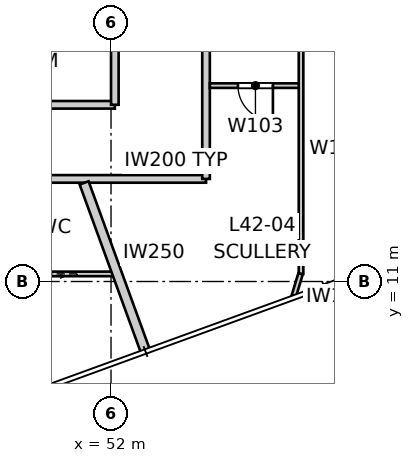
"""IFC4 building model, lengths in metres.
Left out: names, types, materials, properties, quantities, classifications, styles, units other than length and angle.
Written with IfcOpenShell. Run it as: python <this file> out.ifc"""

import sys

from ifc_helpers import new_model, si_unit, direction, frame, frame_2d, origin, place, context, subcontext, project, spatial, rectangle, extrude, element, fill, save


model = new_model("IFC4")
c1 = context("Model", 3, precision=1e-05, world=origin(), true_north=direction((0.0, 1.0)))
c2 = subcontext(c1, "Body", "Model", "MODEL_VIEW")
j1 = project(units=[si_unit("LENGTHUNIT", "METRE"), si_unit("PLANEANGLEUNIT", "RADIAN")], contexts=[c1])
p1 = place(None, origin())
s1 = spatial("IfcSite", under=j1, at=p1, CompositionType="ELEMENT")
p2 = place(p1, origin())
s2 = spatial("IfcBuilding", under=s1, at=p2, CompositionType="ELEMENT")
p3 = place(p2, frame((0.0, 0.0, 154.0)))
s3 = spatial("IfcBuildingStorey", under=s2, at=p3, CompositionType="ELEMENT", Elevation=154.0)
p4 = place(p3, frame((49.242, 13.7, 0.0), z_axis=(0.0, 0.0, 1.0), x_axis=(1.0, 0.0, 0.0)))
e1 = element("IfcWall", 1, at=p4, inside=s3, PredefinedType="PARTITIONING", context=c2, shape_type="SweptSolid", body=[
    extrude(rectangle(XDim=5.258, YDim=0.2, at=frame_2d((2.629, 0.0))), origin(), (0.0, 0.0, 1.0), 3.25),
])
p5 = place(p3, frame((54.5, 13.7, 0.0), z_axis=(0.0, 0.0, 1.0), x_axis=(0.0, 1.0, 0.0)))
e2 = element("IfcWall", 2, at=p5, inside=s3, PredefinedType="PARTITIONING", context=c2, shape_type="SweptSolid", body=[
    extrude(rectangle(XDim=33.4, YDim=0.2, at=frame_2d((16.7, 0.0))), origin(), (0.0, 0.0, 1.0), 3.25),
])
p6 = place(p5, frame((5.028, 0.0, 0.0)))
e3 = element("IfcOpeningElement", 3, at=p6, cuts=e2, PredefinedType="OPENING", context=c2, shape_type="SweptSolid", body=[
    extrude(rectangle(XDim=1.02, YDim=2.1, at=frame_2d((0.51, 1.05))), frame((0.0, 0.11, 0.0), z_axis=(0.0, -1.0, 0.0), x_axis=(1.0, 0.0, 0.0)), (0.0, 0.0, 1.0), 0.22),
])
p7 = place(p5, frame((13.587, 0.0, 0.0)))
e4 = element("IfcOpeningElement", 4, at=p7, cuts=e2, PredefinedType="OPENING", context=c2, shape_type="SweptSolid", body=[
    extrude(rectangle(XDim=1.02, YDim=2.34, at=frame_2d((0.51, 1.17))), frame((0.0, 0.11, 0.0), z_axis=(0.0, -1.0, 0.0), x_axis=(1.0, 0.0, 0.0)), (0.0, 0.0, 1.0), 0.22),
])
p8 = place(p3, frame((52.907, 9.157, 0.0), z_axis=(0.0, 0.0, 1.0), x_axis=(-0.342012883883, 0.939695262975, 0.0)))
e5 = element("IfcWall", 5, at=p8, inside=s3, PredefinedType="PARTITIONING", context=c2, shape_type="SweptSolid", body=[
    extrude(rectangle(XDim=4.722, YDim=0.25, at=frame_2d((2.361, 0.0))), origin(), (0.0, 0.0, 1.0), 3.25),
])
p9 = place(p3, frame((27.9, 15.65, 0.0), z_axis=(0.0, 0.0, 1.0), x_axis=(1.0, 0.0, 0.0)))
e6 = element("IfcWall", 6, at=p9, inside=s3, PredefinedType="PARTITIONING", context=c2, shape_type="SweptSolid", body=[
    extrude(rectangle(XDim=24.2, YDim=0.2, at=frame_2d((12.1, 0.0))), origin(), (0.0, 0.0, 1.0), 3.25),
])
p10 = place(p9, frame((4.391, 0.0, 0.0)))
e7 = element("IfcOpeningElement", 7, at=p10, cuts=e6, PredefinedType="OPENING", context=c2, shape_type="SweptSolid", body=[
    extrude(rectangle(XDim=1.02, YDim=2.1, at=frame_2d((0.51, 1.05))), frame((0.0, 0.11, 0.0), z_axis=(0.0, -1.0, 0.0), x_axis=(1.0, 0.0, 0.0)), (0.0, 0.0, 1.0), 0.22),
])
p11 = place(p9, frame((18.789, 0.0, 0.0)))
e8 = element("IfcOpeningElement", 8, at=p11, cuts=e6, PredefinedType="OPENING", context=c2, shape_type="SweptSolid", body=[
    extrude(rectangle(XDim=1.02, YDim=2.1, at=frame_2d((0.51, 1.05))), frame((0.0, 0.11, 0.0), z_axis=(0.0, -1.0, 0.0), x_axis=(1.0, 0.0, 0.0)), (0.0, 0.0, 1.0), 0.22),
])
p12 = place(p9, frame((11.59, 0.0, 0.0)))
e9 = element("IfcOpeningElement", 9, at=p12, cuts=e6, PredefinedType="OPENING", context=c2, shape_type="SweptSolid", body=[
    extrude(rectangle(XDim=1.02, YDim=2.1, at=frame_2d((0.51, 1.05))), frame((0.0, 0.11, 0.0), z_axis=(0.0, -1.0, 0.0), x_axis=(1.0, 0.0, 0.0)), (0.0, 0.0, 1.0), 0.22),
])
p13 = place(p3, frame((52.1, 15.65, 0.0), z_axis=(0.0, 0.0, 1.0), x_axis=(0.0, 1.0, 0.0)))
e10 = element("IfcWall", 10, at=p13, inside=s3, PredefinedType="PARTITIONING", context=c2, shape_type="SweptSolid", body=[
    extrude(rectangle(XDim=3.17, YDim=0.2, at=frame_2d((1.585, 0.0))), origin(), (0.0, 0.0, 1.0), 3.25),
])
p14 = place(p3, frame((52.164, 11.2, 0.0), z_axis=(0.0, 0.0, 1.0), x_axis=(-1.0, 0.0, 0.0)))
e11 = element("IfcWall", 11, at=p14, inside=s3, PredefinedType="PARTITIONING", context=c2, shape_type="SweptSolid", body=[
    extrude(rectangle(XDim=6.964, YDim=0.12, at=frame_2d((3.482, 0.0))), origin(), (0.0, 0.0, 1.0), 3.25),
])
p15 = place(p14, frame((5.656, 0.0, 0.0)))
e12 = element("IfcOpeningElement", 12, at=p15, cuts=e11, PredefinedType="OPENING", context=c2, shape_type="SweptSolid", body=[
    extrude(rectangle(XDim=0.92, YDim=2.34, at=frame_2d((0.46, 1.17))), frame((0.0, 0.07, 0.0), z_axis=(0.0, -1.0, 0.0), x_axis=(1.0, 0.0, 0.0)), (0.0, 0.0, 1.0), 0.14),
])
p16 = place(p14, frame((1.919, 0.0, 0.0)))
e13 = element("IfcOpeningElement", 13, at=p16, cuts=e11, PredefinedType="OPENING", context=c2, shape_type="SweptSolid", body=[
    extrude(rectangle(XDim=0.96, YDim=2.1, at=frame_2d((0.48, 1.05))), frame((0.0, 0.07, 0.0), z_axis=(0.0, -1.0, 0.0), x_axis=(1.0, 0.0, 0.0)), (0.0, 0.0, 1.0), 0.14),
])
p17 = place(p3, frame((57.0, 16.155, 0.0), z_axis=(0.0, 0.0, 1.0), x_axis=(-1.0, 0.0, 0.0)))
e14 = element("IfcWall", 14, at=p17, inside=s3, PredefinedType="PARTITIONING", context=c2, shape_type="SweptSolid", body=[
    extrude(rectangle(XDim=2.4, YDim=0.12, at=frame_2d((1.2, 0.0))), origin(), (0.0, 0.0, 1.0), 3.25),
])
p18 = place(p17, frame((0.74, 0.0, 0.0)))
e15 = element("IfcOpeningElement", 15, at=p18, cuts=e14, PredefinedType="OPENING", context=c2, shape_type="SweptSolid", body=[
    extrude(rectangle(XDim=0.92, YDim=2.34, at=frame_2d((0.46, 1.17))), frame((0.0, 0.07, 0.0), z_axis=(0.0, -1.0, 0.0), x_axis=(1.0, 0.0, 0.0)), (0.0, 0.0, 1.0), 0.14),
])
p19 = place(p3, frame((57.0, 30.92, 0.0), z_axis=(0.0, 0.0, 1.0), x_axis=(0.0, -1.0, 0.0)))
e16 = element("IfcWall", 16, at=p19, inside=s3, PredefinedType="PARTITIONING", context=c2, shape_type="SweptSolid", body=[
    extrude(rectangle(XDim=19.72, YDim=0.12, at=frame_2d((9.86, 0.0))), origin(), (0.0, 0.0, 1.0), 2.55),
])
p20 = place(p19, frame((12.243, 0.0, 0.0)))
e17 = element("IfcOpeningElement", 17, at=p20, cuts=e16, PredefinedType="OPENING", context=c2, shape_type="SweptSolid", body=[
    extrude(rectangle(XDim=0.92, YDim=2.34, at=frame_2d((0.46, 1.17))), frame((0.0, 0.07, 0.0), z_axis=(0.0, -1.0, 0.0), x_axis=(1.0, 0.0, 0.0)), (0.0, 0.0, 1.0), 0.14),
])
p21 = place(p19, frame((8.764, 0.0, 0.0)))
e18 = element("IfcOpeningElement", 18, at=p21, cuts=e16, PredefinedType="OPENING", context=c2, shape_type="SweptSolid", body=[
    extrude(rectangle(XDim=0.92, YDim=2.34, at=frame_2d((0.46, 1.17))), frame((0.0, 0.07, 0.0), z_axis=(0.0, -1.0, 0.0), x_axis=(1.0, 0.0, 0.0)), (0.0, 0.0, 1.0), 0.14),
])
p22 = place(p19, frame((2.227, 0.0, 0.0)))
e19 = element("IfcOpeningElement", 19, at=p22, cuts=e16, PredefinedType="OPENING", context=c2, shape_type="SweptSolid", body=[
    extrude(rectangle(XDim=0.92, YDim=2.34, at=frame_2d((0.46, 1.17))), frame((0.0, 0.07, 0.0), z_axis=(0.0, -1.0, 0.0), x_axis=(1.0, 0.0, 0.0)), (0.0, 0.0, 1.0), 0.14),
])
p23 = place(p3, frame((56.987, 11.2, 0.0), z_axis=(0.0, 0.0, 1.0), x_axis=(-0.290455219909, -0.956888585588, 0.0)))
e20 = element("IfcWall", 20, at=p23, inside=s3, PredefinedType="PARTITIONING", context=c2, shape_type="SweptSolid", body=[
    extrude(rectangle(XDim=0.605, YDim=0.12, at=frame_2d((0.303, 0.0))), origin(), (0.0, 0.0, 1.0), 3.25),
])
p24 = place(p18, origin())
e21 = element("IfcDoor", 21, at=p24, inside=s3, OperationType="SINGLE_SWING_LEFT", PredefinedType="DOOR", context=c2, shape_type="SweptSolid", body=[
    extrude(rectangle(XDim=0.92, YDim=2.34, at=frame_2d((0.46, 1.17))), frame((0.0, 0.025, 0.0), z_axis=(0.0, -1.0, 0.0), x_axis=(1.0, 0.0, 0.0)), (0.0, 0.0, 1.0), 0.05),
])
fill(e15, e21)
save(model, sys.argv[1])
